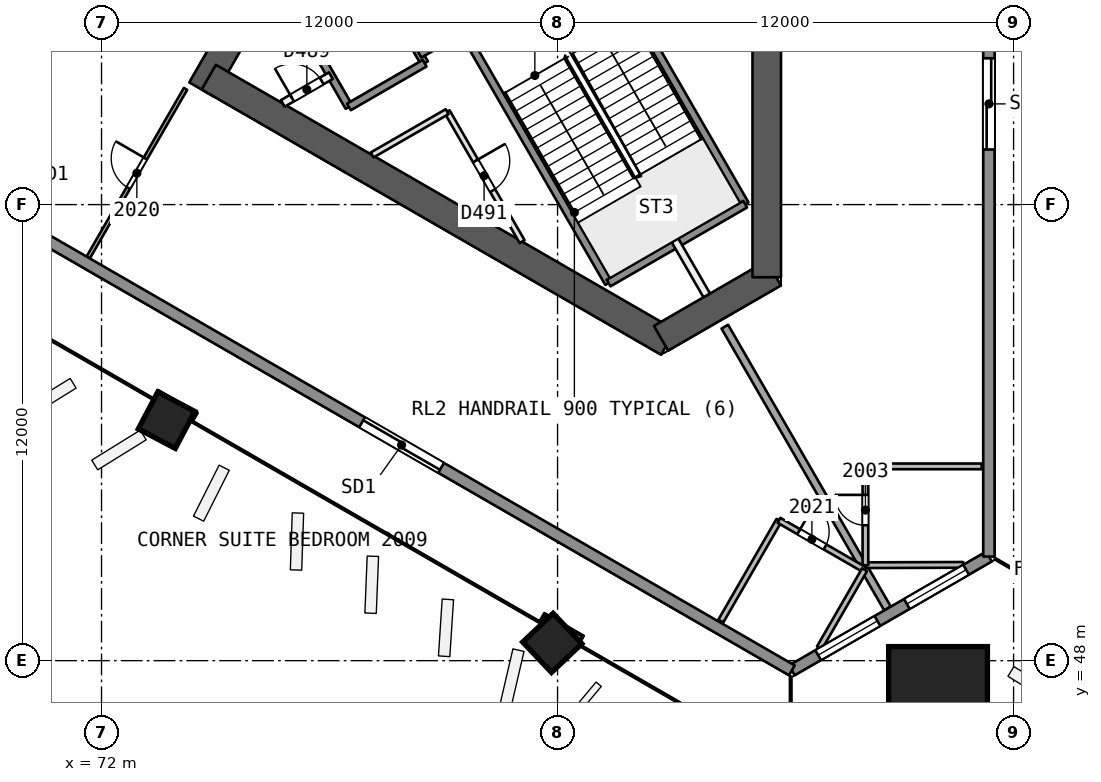
"""IFC4 building model, lengths in metres.
Left out: names, types, materials, properties, quantities, classifications, styles, units other than length and angle.
Written with IfcOpenShell. Run it as: python <this file> out.ifc"""

import sys

from ifc_helpers import new_model, si_unit, direction, frame, frame_2d, origin, origin_2d, place, context, subcontext, project, spatial, rectangle, extrude, element, fill, save


model = new_model("IFC4")
c1 = context("Model", 3, precision=1e-05, world=origin(), true_north=direction((0.0, 1.0)))
c2 = subcontext(c1, "Body", "Model", "MODEL_VIEW")
j1 = project(units=[si_unit("LENGTHUNIT", "METRE"), si_unit("PLANEANGLEUNIT", "RADIAN")], contexts=[c1])
p1 = place(None, origin())
s1 = spatial("IfcSite", under=j1, at=p1, CompositionType="ELEMENT")
p2 = place(p1, origin())
s2 = spatial("IfcBuilding", under=s1, at=p2, CompositionType="ELEMENT")
p3 = place(p2, frame((0.0, 0.0, 86.9)))
s3 = spatial("IfcBuildingStorey", under=s2, at=p3, CompositionType="ELEMENT", Elevation=86.9)
p4 = place(p3, frame((79.717, 71.831, 0.0), z_axis=(0.0, 0.0, 1.0), x_axis=(-0.499996230114, -0.866027580318, 0.0)))
e1 = element("IfcWall", 1, at=p4, inside=s3, PredefinedType="SHEAR", context=c2, shape_type="SweptSolid", body=[
    extrude(rectangle(XDim=10.164, YDim=0.75, at=frame_2d((5.082, 0.0))), origin(), (0.0, 0.0, 1.0), 3.7),
])
p5 = place(p4, frame((0.733, 0.0, 0.0)))
e2 = element("IfcOpeningElement", 2, at=p5, cuts=e1, PredefinedType="OPENING", context=c2, shape_type="SweptSolid", body=[
    extrude(rectangle(XDim=1.2, YDim=2.1, at=frame_2d((0.6, 1.05))), frame((0.0, 0.385, 0.0), z_axis=(0.0, -1.0, 0.0), x_axis=(1.0, 0.0, 0.0)), (0.0, 0.0, 1.0), 0.771),
])
p6 = place(p3, frame((74.822, 63.354, 0.0), z_axis=(0.0, 0.0, 1.0), x_axis=(0.8660248072, -0.500001033313, 0.0)))
e3 = element("IfcWall", 3, at=p6, inside=s3, PredefinedType="SHEAR", context=c2, shape_type="SweptSolid", body=[
    extrude(rectangle(XDim=13.958, YDim=0.75, at=frame_2d((6.979, 0.0))), origin(), (0.0, 0.0, 1.0), 3.7),
])
p7 = place(p3, frame((86.723, 56.483, 0.0), z_axis=(0.0, 0.0, 1.0), x_axis=(0.866017201164, 0.500014207086, 0.0)))
e4 = element("IfcWall", 4, at=p7, inside=s3, PredefinedType="SHEAR", context=c2, shape_type="SweptSolid", body=[
    extrude(rectangle(XDim=3.429, YDim=0.75, at=frame_2d((1.714, 0.0))), origin(), (0.0, 0.0, 1.0), 3.7),
])
p8 = place(p3, frame((89.505, 58.089, 0.0), z_axis=(0.0, 0.0, 1.0), x_axis=(0.0, 1.0, 0.0)))
e5 = element("IfcWall", 5, at=p8, inside=s3, PredefinedType="SHEAR", context=c2, shape_type="SweptSolid", body=[
    extrude(rectangle(XDim=14.117, YDim=0.75, at=frame_2d((7.059, 0.0))), origin(), (0.0, 0.0, 1.0), 3.7),
])
p9 = place(p3, frame((73.711, 54.3, 0.0), z_axis=(0.000857522362, 0.02282328747, 0.99973914708), x_axis=(-0.499938579817, -0.865825375054, 0.020194957859)))
e6 = element("IfcColumn", 6, at=p9, inside=s3, PredefinedType="COLUMN", context=c2, shape_type="SweptSolid", body=[
    extrude(rectangle(XDim=1.1, YDim=1.1, at=origin_2d()), origin(), (0.0, 0.0, 1.0), 3.701),
])
p10 = place(p3, frame((83.872, 48.434, 0.0), z_axis=(-0.00830995476, 0.028161513353, 0.999568843961), x_axis=(-0.502094495686, -0.864577190665, 0.020184122061)))
e7 = element("IfcColumn", 7, at=p10, inside=s3, PredefinedType="COLUMN", context=c2, shape_type="SweptSolid", body=[
    extrude(rectangle(XDim=1.1, YDim=1.1, at=origin_2d()), origin(), (0.0, 0.0, 1.0), 3.702),
])
p11 = place(p3, frame((94.033, 47.033, 0.0), z_axis=(-0.017605841609, 0.030529980019, 0.999378784376), x_axis=(0.499250075017, -0.86574090654, 0.035242663616)))
e8 = element("IfcColumn", 8, at=p11, inside=s3, PredefinedType="COLUMN", context=c2, shape_type="SweptSolid", body=[
    extrude(rectangle(XDim=2.6, YDim=2.6, at=origin_2d()), origin(), (0.0, 0.0, 1.0), 3.702),
])
p12 = place(p3, frame((94.675, 50.521, 0.0), z_axis=(0.0, 0.0, 1.0), x_axis=(-0.99999416924, -0.00341489187, 0.0)))
e9 = element("IfcWall", 9, at=p12, inside=s3, PredefinedType="PARTITIONING", context=c2, shape_type="SweptSolid", body=[
    extrude(rectangle(XDim=2.574, YDim=0.15, at=frame_2d((1.287, 0.0))), origin(), (0.0, 0.0, 1.0), 3.2),
])
p13 = place(p3, frame((92.102, 50.512, 0.0), z_axis=(0.0, 0.0, 1.0), x_axis=(0.0, 1.0, 0.0)))
e10 = element("IfcWall", 10, at=p13, inside=s3, PredefinedType="PARTITIONING", context=c2, shape_type="SweptSolid", body=[
    extrude(rectangle(XDim=2.6, YDim=0.15, at=frame_2d((1.3, 0.0))), origin(), (0.0, 0.0, 1.0), 3.2),
])
p14 = place(p13, frame((1.05, 0.0, 0.0)))
e11 = element("IfcOpeningElement", 11, at=p14, cuts=e10, PredefinedType="OPENING", context=c2, shape_type="SweptSolid", body=[
    extrude(rectangle(XDim=0.8, YDim=2.1, at=frame_2d((0.4, 1.05))), frame((0.0, 0.085, 0.0), z_axis=(0.0, -1.0, 0.0), x_axis=(1.0, 0.0, 0.0)), (0.0, 0.0, 1.0), 0.171),
])
p15 = place(p3, frame((92.102, 53.112, 0.0), z_axis=(0.0, 0.0, 1.0), x_axis=(1.0, 0.0, 0.0)))
e12 = element("IfcWall", 12, at=p15, inside=s3, PredefinedType="PARTITIONING", context=c2, shape_type="SweptSolid", body=[
    extrude(rectangle(XDim=3.06, YDim=0.15, at=frame_2d((1.53, 0.0))), origin(), (0.0, 0.0, 1.0), 3.2),
])
p16 = place(p3, frame((88.401, 56.789, 0.0), z_axis=(0.0, 0.0, 1.0), x_axis=(0.499995498429, -0.866028002752, 0.0)))
e13 = element("IfcWall", 13, at=p16, inside=s3, PredefinedType="PARTITIONING", context=c2, shape_type="SweptSolid", body=[
    extrude(rectangle(XDim=8.565, YDim=0.2, at=frame_2d((4.283, 0.0))), origin(), (0.0, 0.0, 1.0), 3.2),
])
for number, where, z_axis, x_axis in (
    (14, (64.899, 62.504, 0.0), (0.0, 0.0, 1.0), (0.5, 0.866, 0.0)),
    (15, (67.599, 60.946, 0.0), (0.0, 0.0, 1.0), (0.5, 0.866, 0.0)),
):
    element("IfcWall", number, at=place(p3, frame(where, z_axis=z_axis, x_axis=x_axis)), inside=s3, PredefinedType="PARTITIONING", context=c2, shape_type="SweptSolid", body=[
        extrude(rectangle(XDim=13.102, YDim=0.2, at=frame_2d((6.551, 0.0))), origin(), (0.0, 0.0, 1.0), 3.2),
    ])
p17 = place(p3, frame((71.649, 58.607, 0.0), z_axis=(0.0, 0.0, 1.0), x_axis=(0.499972702148, 0.866041163633, 0.0)))
e16 = element("IfcWall", 16, at=p17, inside=s3, PredefinedType="PARTITIONING", context=c2, shape_type="SweptSolid", body=[
    extrude(rectangle(XDim=5.123, YDim=0.1, at=frame_2d((2.562, 0.0))), origin(), (0.0, 0.0, 1.0), 3.2),
])
p18 = place(p17, frame((2.112, 0.0, 0.0)))
e17 = element("IfcOpeningElement", 17, at=p18, cuts=e16, PredefinedType="OPENING", context=c2, shape_type="SweptSolid", body=[
    extrude(rectangle(XDim=0.9, YDim=2.1, at=frame_2d((0.45, 1.05))), frame((0.0, 0.061, 0.0), z_axis=(0.0, -1.0, 0.0), x_axis=(1.0, 0.0, 0.0)), (0.0, 0.0, 1.0), 0.121),
])
p19 = place(p3, frame((88.297, 49.043, 0.0), z_axis=(0.0, 0.0, 1.0), x_axis=(0.499966498333, 0.866044745117, 0.0)))
e18 = element("IfcWall", 18, at=p19, inside=s3, PredefinedType="PARTITIONING", context=c2, shape_type="SweptSolid", body=[
    extrude(rectangle(XDim=3.06, YDim=0.15, at=frame_2d((1.53, 0.0))), origin(), (0.0, 0.0, 1.0), 3.2),
])
p20 = place(p3, frame((89.827, 51.693, 0.0), z_axis=(0.0, 0.0, 1.0), x_axis=(0.866021400173, -0.500006934395, 0.0)))
e19 = element("IfcWall", 19, at=p20, inside=s3, PredefinedType="PARTITIONING", context=c2, shape_type="SweptSolid", body=[
    extrude(rectangle(XDim=2.6, YDim=0.15, at=frame_2d((1.3, 0.0))), origin(), (0.0, 0.0, 1.0), 3.2),
])
p21 = place(p20, frame((0.6, 0.0, 0.0)))
e20 = element("IfcOpeningElement", 20, at=p21, cuts=e19, PredefinedType="OPENING", context=c2, shape_type="SweptSolid", body=[
    extrude(rectangle(XDim=0.8, YDim=2.1, at=frame_2d((0.4, 1.05))), frame((0.0, 0.085, 0.0), z_axis=(0.0, -1.0, 0.0), x_axis=(1.0, 0.0, 0.0)), (0.0, 0.0, 1.0), 0.171),
])
p22 = place(p3, frame((92.079, 50.393, 0.0), z_axis=(0.0, 0.0, 1.0), x_axis=(-0.499953838557, -0.866052053466, 0.0)))
e21 = element("IfcWall", 21, at=p22, inside=s3, PredefinedType="PARTITIONING", context=c2, shape_type="SweptSolid", body=[
    extrude(rectangle(XDim=2.375, YDim=0.15, at=frame_2d((1.188, 0.0))), origin(), (0.0, 0.0, 1.0), 3.2),
])
p23 = place(p3, frame((95.351, 50.739, 0.0), z_axis=(0.0, 0.0, 1.0), x_axis=(-0.866026717539, -0.499997724503, 0.0)))
e22 = element("IfcWall", 22, at=p23, inside=s3, PredefinedType="SOLIDWALL", context=c2, shape_type="SweptSolid", body=[
    extrude(rectangle(XDim=5.988, YDim=0.3, at=frame_2d((2.994, 0.0))), origin(), (0.0, 0.0, 1.0), 3.2),
])
p24 = place(p23, frame((0.693, 0.0, 0.9)))
e23 = element("IfcOpeningElement", 23, at=p24, cuts=e22, PredefinedType="OPENING", context=c2, shape_type="SweptSolid", body=[
    extrude(rectangle(XDim=1.8, YDim=1.5, at=frame_2d((0.9, 0.75))), frame((0.0, 0.161, 0.0), z_axis=(0.0, -1.0, 0.0), x_axis=(1.0, 0.0, 0.0)), (0.0, 0.0, 1.0), 0.321),
])
p25 = place(p23, frame((3.389, 0.0, 0.9)))
e24 = element("IfcOpeningElement", 24, at=p25, cuts=e22, PredefinedType="OPENING", context=c2, shape_type="SweptSolid", body=[
    extrude(rectangle(XDim=1.8, YDim=1.5, at=frame_2d((0.9, 0.75))), frame((0.0, 0.161, 0.0), z_axis=(0.0, -1.0, 0.0), x_axis=(1.0, 0.0, 0.0)), (0.0, 0.0, 1.0), 0.321),
])
p26 = place(p3, frame((95.351, 109.261, 0.0), z_axis=(0.0, 0.0, 1.0), x_axis=(0.0, -1.0, 0.0)))
e25 = element("IfcWall", 25, at=p26, inside=s3, PredefinedType="SOLIDWALL", context=c2, shape_type="SweptSolid", body=[
    extrude(rectangle(XDim=58.522, YDim=0.3, at=frame_2d((29.261, 0.0))), origin(), (0.0, 0.0, 1.0), 3.2),
])
p27 = place(p26, frame((28.061, 0.0, 0.0)))
e26 = element("IfcOpeningElement", 26, at=p27, cuts=e25, PredefinedType="OPENING", context=c2, shape_type="SweptSolid", body=[
    extrude(rectangle(XDim=2.4, YDim=2.4, at=frame_2d((1.2, 1.2))), frame((0.0, 0.161, 0.0), z_axis=(0.0, -1.0, 0.0), x_axis=(1.0, 0.0, 0.0)), (0.0, 0.0, 1.0), 0.321),
])
p28 = place(p26, frame((33.829, 0.0, 0.0)))
e27 = element("IfcOpeningElement", 27, at=p28, cuts=e25, PredefinedType="OPENING", context=c2, shape_type="SweptSolid", body=[
    extrude(rectangle(XDim=2.4, YDim=2.4, at=frame_2d((1.2, 1.2))), frame((0.0, 0.161, 0.0), z_axis=(0.0, -1.0, 0.0), x_axis=(1.0, 0.0, 0.0)), (0.0, 0.0, 1.0), 0.321),
])
p29 = place(p26, frame((45.411, 0.0, 0.0)))
e28 = element("IfcOpeningElement", 28, at=p29, cuts=e25, PredefinedType="OPENING", context=c2, shape_type="SweptSolid", body=[
    extrude(rectangle(XDim=2.4, YDim=2.4, at=frame_2d((1.2, 1.2))), frame((0.0, 0.161, 0.0), z_axis=(0.0, -1.0, 0.0), x_axis=(1.0, 0.0, 0.0)), (0.0, 0.0, 1.0), 0.321),
])
p30 = place(p26, frame((22.293, 0.0, 0.0)))
e29 = element("IfcOpeningElement", 29, at=p30, cuts=e25, PredefinedType="OPENING", context=c2, shape_type="SweptSolid", body=[
    extrude(rectangle(XDim=2.4, YDim=2.4, at=frame_2d((1.2, 1.2))), frame((0.0, 0.161, 0.0), z_axis=(0.0, -1.0, 0.0), x_axis=(1.0, 0.0, 0.0)), (0.0, 0.0, 1.0), 0.321),
])
p31 = place(p26, frame((10.658, 0.0, 0.0)))
e30 = element("IfcOpeningElement", 30, at=p31, cuts=e25, PredefinedType="OPENING", context=c2, shape_type="SweptSolid", body=[
    extrude(rectangle(XDim=2.4, YDim=2.4, at=frame_2d((1.2, 1.2))), frame((0.0, 0.161, 0.0), z_axis=(0.0, -1.0, 0.0), x_axis=(1.0, 0.0, 0.0)), (0.0, 0.0, 1.0), 0.321),
])
p32 = place(p3, frame((90.165, 47.745, 0.0), z_axis=(0.0, 0.0, 1.0), x_axis=(-0.866025940441, 0.499999070483, 0.0)))
e31 = element("IfcWall", 31, at=p32, inside=s3, PredefinedType="SOLIDWALL", context=c2, shape_type="SweptSolid", body=[
    extrude(rectangle(XDim=58.522, YDim=0.3, at=frame_2d((29.261, 0.0))), origin(), (0.0, 0.0, 1.0), 3.2),
])
p33 = place(p32, frame((44.294, 0.0, 0.0)))
e32 = element("IfcOpeningElement", 32, at=p33, cuts=e31, PredefinedType="OPENING", context=c2, shape_type="SweptSolid", body=[
    extrude(rectangle(XDim=2.4, YDim=2.4, at=frame_2d((1.2, 1.2))), frame((0.0, 0.161, 0.0), z_axis=(0.0, -1.0, 0.0), x_axis=(1.0, 0.0, 0.0)), (0.0, 0.0, 1.0), 0.321),
])
p34 = place(p32, frame((22.605, 0.0, 0.0)))
e33 = element("IfcOpeningElement", 33, at=p34, cuts=e31, PredefinedType="OPENING", context=c2, shape_type="SweptSolid", body=[
    extrude(rectangle(XDim=2.4, YDim=2.4, at=frame_2d((1.2, 1.2))), frame((0.0, 0.161, 0.0), z_axis=(0.0, -1.0, 0.0), x_axis=(1.0, 0.0, 0.0)), (0.0, 0.0, 1.0), 0.321),
])
p35 = place(p32, frame((10.658, 0.0, 0.0)))
e34 = element("IfcOpeningElement", 34, at=p35, cuts=e31, PredefinedType="OPENING", context=c2, shape_type="SweptSolid", body=[
    extrude(rectangle(XDim=2.4, YDim=2.4, at=frame_2d((1.2, 1.2))), frame((0.0, 0.161, 0.0), z_axis=(0.0, -1.0, 0.0), x_axis=(1.0, 0.0, 0.0)), (0.0, 0.0, 1.0), 0.321),
])
p36 = place(p32, frame((29.92, 0.0, 0.9)))
e35 = element("IfcOpeningElement", 35, at=p36, cuts=e31, PredefinedType="OPENING", context=c2, shape_type="SweptSolid", body=[
    extrude(rectangle(XDim=1.8, YDim=1.5, at=frame_2d((0.9, 0.75))), frame((0.0, 0.161, 0.0), z_axis=(0.0, -1.0, 0.0), x_axis=(1.0, 0.0, 0.0)), (0.0, 0.0, 1.0), 0.321),
])
p37 = place(p32, frame((26.802, 0.0, 0.9)))
e36 = element("IfcOpeningElement", 36, at=p37, cuts=e31, PredefinedType="OPENING", context=c2, shape_type="SweptSolid", body=[
    extrude(rectangle(XDim=1.8, YDim=1.5, at=frame_2d((0.9, 0.75))), frame((0.0, 0.161, 0.0), z_axis=(0.0, -1.0, 0.0), x_axis=(1.0, 0.0, 0.0)), (0.0, 0.0, 1.0), 0.321),
])
p38 = place(p3, frame((77.135, 64.952, 0.0), z_axis=(0.0, 0.0, 1.0), x_axis=(0.499996545922, -0.866027397988, 0.0)))
e37 = element("IfcWall", 37, at=p38, inside=s3, PredefinedType="SOLIDWALL", context=c2, shape_type="SweptSolid", body=[
    extrude(rectangle(XDim=2.75, YDim=0.2, at=frame_2d((1.375, 0.0))), origin(), (0.0, 0.0, 1.0), 3.2),
])
p39 = place(p3, frame((81.094, 62.445, 0.0), z_axis=(0.0, 0.0, 1.0), x_axis=(0.499990112884, -0.866031112038, 0.0)))
e38 = element("IfcWall", 38, at=p39, inside=s3, PredefinedType="PARTITIONING", context=c2, shape_type="SweptSolid", body=[
    extrude(rectangle(XDim=3.948, YDim=0.15, at=frame_2d((1.974, 0.0))), origin(), (0.0, 0.0, 1.0), 3.2),
])
p40 = place(p39, frame((1.496, 0.0, 0.0)))
e39 = element("IfcOpeningElement", 39, at=p40, cuts=e38, PredefinedType="OPENING", context=c2, shape_type="SweptSolid", body=[
    extrude(rectangle(XDim=0.9, YDim=2.1, at=frame_2d((0.45, 1.05))), frame((0.0, 0.085, 0.0), z_axis=(0.0, -1.0, 0.0), x_axis=(1.0, 0.0, 0.0)), (0.0, 0.0, 1.0), 0.171),
])
p41 = place(p3, frame((79.127, 66.102, 0.0), z_axis=(0.0, 0.0, 1.0), x_axis=(0.499996545922, -0.866027397988, 0.0)))
e40 = element("IfcWall", 40, at=p41, inside=s3, PredefinedType="SOLIDWALL", context=c2, shape_type="SweptSolid", body=[
    extrude(rectangle(XDim=2.75, YDim=0.2, at=frame_2d((1.375, 0.0))), origin(), (0.0, 0.0, 1.0), 3.2),
])
p42 = place(p3, frame((81.493, 64.604, 0.0), z_axis=(0.0, 0.0, 1.0), x_axis=(0.500006057782, -0.866021906294, 0.0)))
e41 = element("IfcWall", 41, at=p42, inside=s3, PredefinedType="SOLIDWALL", context=c2, shape_type="SweptSolid", body=[
    extrude(rectangle(XDim=7.7, YDim=0.2, at=frame_2d((3.85, 0.0))), origin(), (0.0, 0.0, 1.0), 3.2),
])
p43 = place(p3, frame((87.09, 59.06, 0.0), z_axis=(0.0, 0.0, 1.0), x_axis=(0.499937194881, -0.866061661301, 0.0)))
e42 = element("IfcWall", 42, at=p43, inside=s3, PredefinedType="PARTITIONING", context=c2, shape_type="SweptSolid", body=[
    extrude(rectangle(XDim=1.673, YDim=0.2, at=frame_2d((0.836, 0.0))), origin(), (0.0, 0.0, 1.0), 3.2),
])
p44 = place(p3, frame((85.087, 66.679, 0.0), z_axis=(0.0, 0.0, 1.0), x_axis=(0.500019787375, -0.866013979237, 0.0)))
e43 = element("IfcWall", 43, at=p44, inside=s3, PredefinedType="SOLIDWALL", context=c2, shape_type="SweptSolid", body=[
    extrude(rectangle(XDim=7.7, YDim=0.2, at=frame_2d((3.85, 0.0))), origin(), (0.0, 0.0, 1.0), 3.2),
])
p45 = place(p44, frame((0.55, 0.0, 0.0)))
e44 = element("IfcOpeningElement", 44, at=p45, cuts=e43, PredefinedType="OPENING", context=c2, shape_type="SweptSolid", body=[
    extrude(rectangle(XDim=1.1, YDim=2.1, at=frame_2d((0.55, 1.05))), frame((0.0, 0.11, 0.0), z_axis=(0.0, -1.0, 0.0), x_axis=(1.0, 0.0, 0.0)), (0.0, 0.0, 1.0), 0.221),
])
p46 = place(p3, frame((76.77, 62.662, 0.0), z_axis=(0.0, 0.0, 1.0), x_axis=(0.866054810376, 0.49994906283, 0.0)))
e45 = element("IfcWall", 45, at=p46, inside=s3, PredefinedType="PARTITIONING", context=c2, shape_type="SweptSolid", body=[
    extrude(rectangle(XDim=1.461, YDim=0.2, at=frame_2d((0.73, 0.0))), origin(), (0.0, 0.0, 1.0), 3.2),
])
p47 = place(p46, frame((0.281, 0.0, 0.0)))
e46 = element("IfcOpeningElement", 46, at=p47, cuts=e45, PredefinedType="OPENING", context=c2, shape_type="SweptSolid", body=[
    extrude(rectangle(XDim=0.9, YDim=2.1, at=frame_2d((0.45, 1.05))), frame((0.0, 0.11, 0.0), z_axis=(0.0, -1.0, 0.0), x_axis=(1.0, 0.0, 0.0)), (0.0, 0.0, 1.0), 0.221),
])
p48 = place(p3, frame((80.367, 63.954, 0.0), z_axis=(0.0, 0.0, 1.0), x_axis=(0.866026575979, 0.499997969693, 0.0)))
e47 = element("IfcWall", 47, at=p48, inside=s3, PredefinedType="SOLIDWALL", context=c2, shape_type="SweptSolid", body=[
    extrude(rectangle(XDim=6.75, YDim=0.2, at=frame_2d((3.375, 0.0))), origin(), (0.0, 0.0, 1.0), 3.2),
])
p49 = place(p3, frame((78.51, 62.57, 0.0), z_axis=(0.0, 0.0, 1.0), x_axis=(0.866053019151, 0.499952165731, 0.0)))
e48 = element("IfcWall", 48, at=p49, inside=s3, PredefinedType="SOLIDWALL", context=c2, shape_type="SweptSolid", body=[
    extrude(rectangle(XDim=2.3, YDim=0.2, at=frame_2d((1.15, 0.0))), origin(), (0.0, 0.0, 1.0), 3.2),
])
p50 = place(p3, frame((79.12, 61.305, 0.0), z_axis=(0.0, 0.0, 1.0), x_axis=(0.866046471269, 0.499963508271, 0.0)))
e49 = element("IfcWall", 49, at=p50, inside=s3, PredefinedType="PARTITIONING", context=c2, shape_type="SweptSolid", body=[
    extrude(rectangle(XDim=2.28, YDim=0.15, at=frame_2d((1.14, 0.0))), origin(), (0.0, 0.0, 1.0), 3.2),
])
p51 = place(p3, frame((85.343, 57.935, 0.0), z_axis=(0.0, 0.0, 1.0), x_axis=(0.866004344652, 0.500036473714, 0.0)))
e50 = element("IfcWall", 50, at=p51, inside=s3, PredefinedType="SOLIDWALL", context=c2, shape_type="SweptSolid", body=[
    extrude(rectangle(XDim=4.15, YDim=0.2, at=frame_2d((2.075, 0.0))), origin(), (0.0, 0.0, 1.0), 3.2),
])
p52 = place(p14, origin())
e51 = element("IfcDoor", 51, at=p52, inside=s3, OperationType="SINGLE_SWING_RIGHT", PredefinedType="NOTDEFINED", context=c2, shape_type="SweptSolid", body=[
    extrude(rectangle(XDim=0.8, YDim=2.1, at=frame_2d((0.4, 1.05))), frame((0.0, 0.025, 0.0), z_axis=(0.0, -1.0, 0.0), x_axis=(1.0, 0.0, 0.0)), (0.0, 0.0, 1.0), 0.05),
])
fill(e11, e51)
p53 = place(p18, origin())
e52 = element("IfcDoor", 52, at=p53, inside=s3, OperationType="SINGLE_SWING_RIGHT", PredefinedType="NOTDEFINED", context=c2, shape_type="SweptSolid", body=[
    extrude(rectangle(XDim=0.9, YDim=2.1, at=frame_2d((0.45, 1.05))), frame((0.0, 0.025, 0.0), z_axis=(0.0, -1.0, 0.0), x_axis=(1.0, 0.0, 0.0)), (0.0, 0.0, 1.0), 0.05),
])
fill(e17, e52)
p54 = place(p21, origin())
e53 = element("IfcDoor", 53, at=p54, inside=s3, OperationType="SINGLE_SWING_LEFT", PredefinedType="NOTDEFINED", context=c2, shape_type="SweptSolid", body=[
    extrude(rectangle(XDim=0.8, YDim=2.1, at=frame_2d((0.4, 1.05))), frame((0.0, 0.025, 0.0), z_axis=(0.0, -1.0, 0.0), x_axis=(1.0, 0.0, 0.0)), (0.0, 0.0, 1.0), 0.05),
])
fill(e20, e53)
p55 = place(p24, origin())
e54 = element("IfcWindow", 54, at=p55, inside=s3, PartitioningType="SINGLE_PANEL", PredefinedType="WINDOW", context=c2, shape_type="SweptSolid", body=[
    extrude(rectangle(XDim=1.8, YDim=1.5, at=frame_2d((0.9, 0.75))), frame((0.0, 0.03, 0.0), z_axis=(0.0, -1.0, 0.0), x_axis=(1.0, 0.0, 0.0)), (0.0, 0.0, 1.0), 0.06),
])
fill(e23, e54)
p56 = place(p25, origin())
e55 = element("IfcWindow", 55, at=p56, inside=s3, PartitioningType="SINGLE_PANEL", PredefinedType="WINDOW", context=c2, shape_type="SweptSolid", body=[
    extrude(rectangle(XDim=1.8, YDim=1.5, at=frame_2d((0.9, 0.75))), frame((0.0, 0.03, 0.0), z_axis=(0.0, -1.0, 0.0), x_axis=(1.0, 0.0, 0.0)), (0.0, 0.0, 1.0), 0.06),
])
fill(e24, e55)
p57 = place(p29, origin())
e56 = element("IfcDoor", 56, at=p57, inside=s3, OperationType="SLIDING_TO_LEFT", PredefinedType="NOTDEFINED", context=c2, shape_type="SweptSolid", body=[
    extrude(rectangle(XDim=2.4, YDim=2.4, at=frame_2d((1.2, 1.2))), frame((0.0, 0.025, 0.0), z_axis=(0.0, -1.0, 0.0), x_axis=(1.0, 0.0, 0.0)), (0.0, 0.0, 1.0), 0.05),
])
fill(e28, e56)
p58 = place(p35, origin())
e57 = element("IfcDoor", 57, at=p58, inside=s3, OperationType="SLIDING_TO_LEFT", PredefinedType="NOTDEFINED", context=c2, shape_type="SweptSolid", body=[
    extrude(rectangle(XDim=2.4, YDim=2.4, at=frame_2d((1.2, 1.2))), frame((0.0, 0.025, 0.0), z_axis=(0.0, -1.0, 0.0), x_axis=(1.0, 0.0, 0.0)), (0.0, 0.0, 1.0), 0.05),
])
fill(e34, e57)
p59 = place(p47, origin())
e58 = element("IfcDoor", 58, at=p59, inside=s3, OperationType="SINGLE_SWING_LEFT", PredefinedType="NOTDEFINED", context=c2, shape_type="SweptSolid", body=[
    extrude(rectangle(XDim=0.9, YDim=2.1, at=frame_2d((0.45, 1.05))), frame((0.0, 0.025, 0.0), z_axis=(0.0, -1.0, 0.0), x_axis=(1.0, 0.0, 0.0)), (0.0, 0.0, 1.0), 0.05),
])
fill(e46, e58)
p60 = place(p40, origin())
e59 = element("IfcDoor", 59, at=p60, inside=s3, OperationType="SINGLE_SWING_LEFT", PredefinedType="NOTDEFINED", context=c2, shape_type="SweptSolid", body=[
    extrude(rectangle(XDim=0.9, YDim=2.1, at=frame_2d((0.45, 1.05))), frame((0.0, 0.025, 0.0), z_axis=(0.0, -1.0, 0.0), x_axis=(1.0, 0.0, 0.0)), (0.0, 0.0, 1.0), 0.05),
])
fill(e39, e59)
save(model, sys.argv[1])
